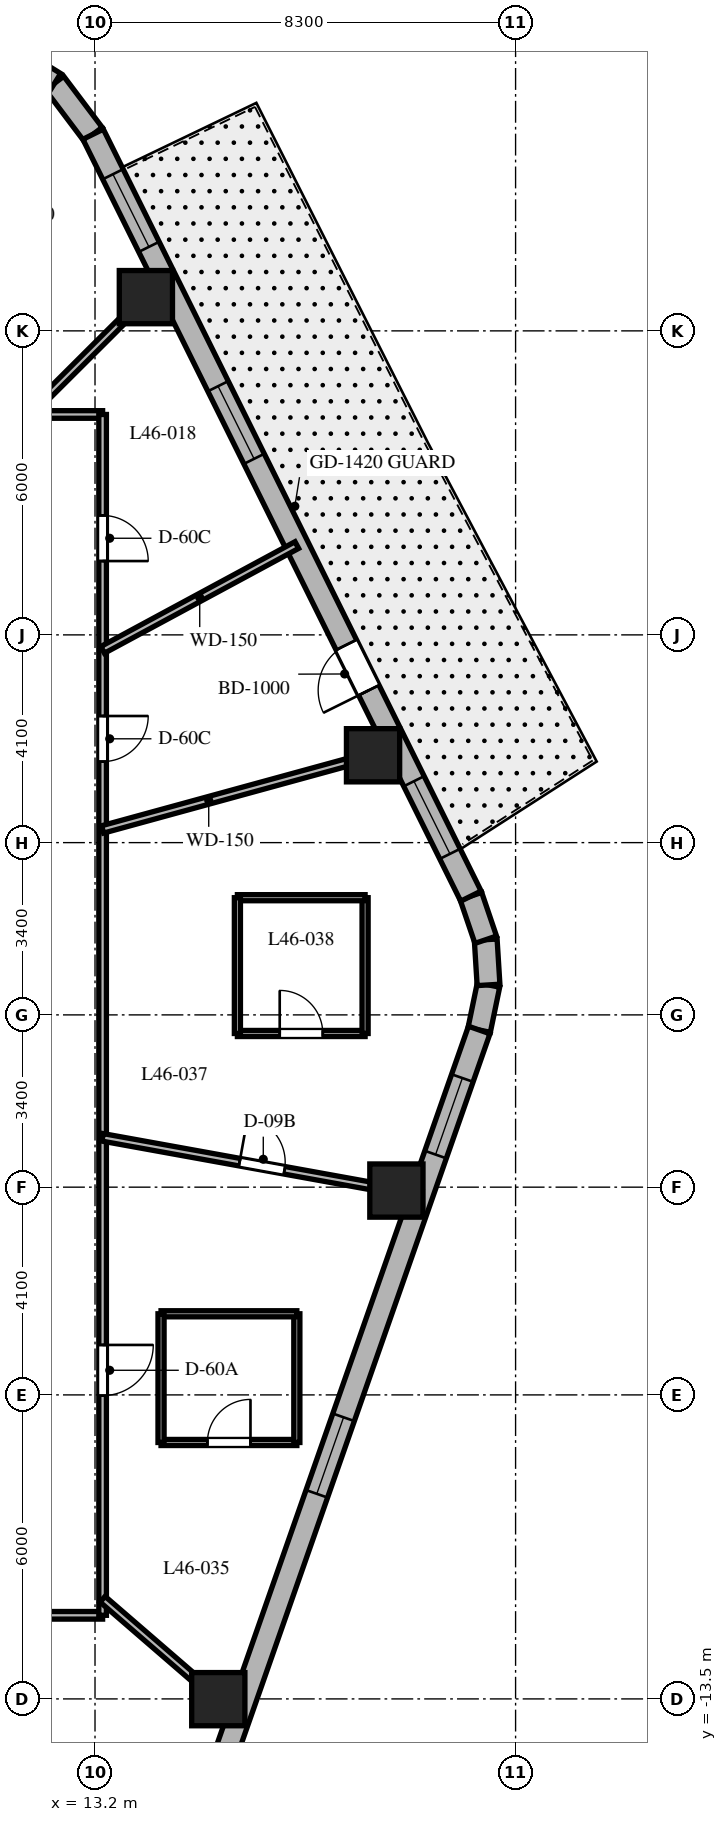
"""IFC4 building model, lengths in metres.
Left out: names, types, materials, properties, quantities, classifications, styles, units other than length and angle.
Written with IfcOpenShell. Run it as: python <this file> out.ifc"""

import sys

from ifc_helpers import new_model, si_unit, direction, frame, frame_2d, origin, origin_2d, place, context, subcontext, project, spatial, rectangle, extrude, element, fill, save


model = new_model("IFC4")
c1 = context("Model", 3, precision=1e-05, world=origin(), true_north=direction((0.0, 1.0)))
c2 = subcontext(c1, "Body", "Model", "MODEL_VIEW")
j1 = project(units=[si_unit("LENGTHUNIT", "METRE"), si_unit("PLANEANGLEUNIT", "RADIAN")], contexts=[c1])
p1 = place(None, origin())
s1 = spatial("IfcSite", under=j1, at=p1, CompositionType="ELEMENT")
p2 = place(p1, origin())
s2 = spatial("IfcBuilding", under=s1, at=p2, CompositionType="ELEMENT")
p3 = place(p2, frame((0.0, 0.0, 186.7)))
s3 = spatial("IfcBuildingStorey", under=s2, at=p3, CompositionType="ELEMENT", Elevation=186.7)
for number, where, z_axis, x_axis in (
    (1, (15.633, -13.505, 0.0), (0.0, 0.0, 1.0), (1.0, 0.0, 0.0)),
    (2, (19.148, -3.467, 0.0), (0.0, 0.0, 1.0), (1.0, 0.0, 0.0)),
    (3, (18.687, 5.124, 0.0), (0.0, 0.0, 1.0), (1.0, 0.0, 0.0)),
    (4, (14.204, 14.166, 0.0), (0.0, 0.0, 1.0), (1.0, 0.0, 0.0)),
):
    element("IfcColumn", number, at=place(p3, frame(where, z_axis=z_axis, x_axis=x_axis)), inside=s3, PredefinedType="COLUMN", context=c2, shape_type="SweptSolid", body=[
        extrude(rectangle(XDim=1.05, YDim=1.05, at=origin_2d()), origin(), (0.0, 0.0, 1.0), 3.7),
    ])
p4 = place(p3, frame((20.782, -0.298, 0.0), z_axis=(0.0, 0.0, 1.0), x_axis=(0.202570068411, 0.979267771033, 0.0)))
e5 = element("IfcWall", 5, at=p4, inside=s3, PredefinedType="SOLIDWALL", context=c2, shape_type="SweptSolid", body=[
    extrude(rectangle(XDim=0.909, YDim=0.45, at=frame_2d((0.454, 0.0))), origin(), (0.0, 0.0, 1.0), 3.4),
])
p5 = place(p3, frame((20.966, 0.592, 0.0), z_axis=(0.0, 0.0, 1.0), x_axis=(-0.061748898935, 0.998091715966, 0.0)))
e6 = element("IfcWall", 6, at=p5, inside=s3, PredefinedType="SOLIDWALL", context=c2, shape_type="SweptSolid", body=[
    extrude(rectangle(XDim=0.894, YDim=0.45, at=frame_2d((0.447, 0.0))), origin(), (0.0, 0.0, 1.0), 3.4),
])
p6 = place(p3, frame((20.911, 1.484, 0.0), z_axis=(0.0, 0.0, 1.0), x_axis=(-0.321623334353, 0.946867694453, 0.0)))
e7 = element("IfcWall", 7, at=p6, inside=s3, PredefinedType="SOLIDWALL", context=c2, shape_type="SweptSolid", body=[
    extrude(rectangle(XDim=0.909, YDim=0.45, at=frame_2d((0.454, 0.0))), origin(), (0.0, 0.0, 1.0), 3.4),
])
p7 = place(p3, frame((13.162, 17.381, 0.0), z_axis=(0.0, 0.0, 1.0), x_axis=(-0.601515770517, 0.798860925205, 0.0)))
e8 = element("IfcWall", 8, at=p7, inside=s3, PredefinedType="SOLIDWALL", context=c2, shape_type="SweptSolid", body=[
    extrude(rectangle(XDim=1.262, YDim=0.45, at=frame_2d((0.631, 0.0))), origin(), (0.0, 0.0, 1.0), 3.4),
])
p8 = place(p3, frame((12.403, 18.389, 0.0), z_axis=(0.0, 0.0, 1.0), x_axis=(-0.849795170926, 0.527113049991, 0.0)))
e9 = element("IfcWall", 9, at=p8, inside=s3, PredefinedType="SOLIDWALL", context=c2, shape_type="SweptSolid", body=[
    extrude(rectangle(XDim=1.241, YDim=0.45, at=frame_2d((0.62, 0.0))), origin(), (0.0, 0.0, 1.0), 3.4),
])
p9 = place(p3, frame((14.937, -16.993, 0.0), z_axis=(0.0, 0.0, 1.0), x_axis=(0.330431575061, 0.943829949834, 0.0)))
e10 = element("IfcWall", 10, at=p9, inside=s3, PredefinedType="SOLIDWALL", context=c2, shape_type="SweptSolid", body=[
    extrude(rectangle(XDim=17.689, YDim=0.45, at=frame_2d((8.844, 0.0))), origin(), (0.0, 0.0, 1.0), 3.4),
])
p10 = place(p9, frame((0.95, 0.0, 0.8)))
e11 = element("IfcOpeningElement", 11, at=p10, cuts=e10, PredefinedType="OPENING", context=c2, shape_type="SweptSolid", body=[
    extrude(rectangle(XDim=1.6, YDim=1.75, at=frame_2d((0.8, 0.875))), frame((0.0, 0.235, 0.0), z_axis=(0.0, -1.0, 0.0), x_axis=(1.0, 0.0, 0.0)), (0.0, 0.0, 1.0), 0.47),
])
p11 = place(p9, frame((7.99, 0.0, 0.8)))
e12 = element("IfcOpeningElement", 12, at=p11, cuts=e10, PredefinedType="OPENING", context=c2, shape_type="SweptSolid", body=[
    extrude(rectangle(XDim=1.6, YDim=1.75, at=frame_2d((0.8, 0.875))), frame((0.0, 0.235, 0.0), z_axis=(0.0, -1.0, 0.0), x_axis=(1.0, 0.0, 0.0)), (0.0, 0.0, 1.0), 0.47),
])
p12 = place(p9, frame((15.084, 0.0, 0.8)))
e13 = element("IfcOpeningElement", 13, at=p12, cuts=e10, PredefinedType="OPENING", context=c2, shape_type="SweptSolid", body=[
    extrude(rectangle(XDim=1.6, YDim=1.75, at=frame_2d((0.8, 0.875))), frame((0.0, 0.235, 0.0), z_axis=(0.0, -1.0, 0.0), x_axis=(1.0, 0.0, 0.0)), (0.0, 0.0, 1.0), 0.47),
])
p13 = place(p3, frame((20.618, 2.344, 0.0), z_axis=(0.0, 0.0, 1.0), x_axis=(-0.444243691097, 0.895905990002, 0.0)))
e14 = element("IfcWall", 14, at=p13, inside=s3, PredefinedType="SOLIDWALL", context=c2, shape_type="SweptSolid", body=[
    extrude(rectangle(XDim=16.784, YDim=0.45, at=frame_2d((8.392, 0.0))), origin(), (0.0, 0.0, 1.0), 3.4),
])
p14 = place(p13, frame((4.535, 0.0, 0.0)))
e15 = element("IfcOpeningElement", 15, at=p14, cuts=e14, PredefinedType="OPENING", context=c2, shape_type="SweptSolid", body=[
    extrude(rectangle(XDim=1.0, YDim=2.15, at=frame_2d((0.5, 1.075))), frame((0.0, 0.235, 0.0), z_axis=(0.0, -1.0, 0.0), x_axis=(1.0, 0.0, 0.0)), (0.0, 0.0, 1.0), 0.47),
])
p15 = place(p13, frame((9.633, 0.0, 0.8)))
e16 = element("IfcOpeningElement", 16, at=p15, cuts=e14, PredefinedType="OPENING", context=c2, shape_type="SweptSolid", body=[
    extrude(rectangle(XDim=1.6, YDim=1.75, at=frame_2d((0.8, 0.875))), frame((0.0, 0.235, 0.0), z_axis=(0.0, -1.0, 0.0), x_axis=(1.0, 0.0, 0.0)), (0.0, 0.0, 1.0), 0.47),
])
p16 = place(p13, frame((14.303, 0.0, 0.8)))
e17 = element("IfcOpeningElement", 17, at=p16, cuts=e14, PredefinedType="OPENING", context=c2, shape_type="SweptSolid", body=[
    extrude(rectangle(XDim=1.6, YDim=1.75, at=frame_2d((0.8, 0.875))), frame((0.0, 0.235, 0.0), z_axis=(0.0, -1.0, 0.0), x_axis=(1.0, 0.0, 0.0)), (0.0, 0.0, 1.0), 0.47),
])
p17 = place(p13, frame((0.931, 0.0, 0.8)))
e18 = element("IfcOpeningElement", 18, at=p17, cuts=e14, PredefinedType="OPENING", context=c2, shape_type="SweptSolid", body=[
    extrude(rectangle(XDim=1.6, YDim=1.75, at=frame_2d((0.8, 0.875))), frame((0.0, 0.235, 0.0), z_axis=(0.0, -1.0, 0.0), x_axis=(1.0, 0.0, 0.0)), (0.0, 0.0, 1.0), 0.47),
])
p18 = place(p3, frame((13.35, -11.85, 0.0), z_axis=(0.0, 0.0, 1.0), x_axis=(-1.0, 0.0, 0.0)))
e19 = element("IfcWall", 19, at=p18, inside=s3, PredefinedType="PARTITIONING", context=c2, shape_type="SweptSolid", body=[
    extrude(rectangle(XDim=26.7, YDim=0.15, at=frame_2d((13.35, 0.0))), origin(), (0.0, 0.0, 1.0), 2.84),
])
p19 = place(p18, frame((22.459, 0.0, 0.0)))
e20 = element("IfcOpeningElement", 20, at=p19, cuts=e19, PredefinedType="OPENING", context=c2, shape_type="SweptSolid", body=[
    extrude(rectangle(XDim=0.9, YDim=2.03, at=frame_2d((0.45, 1.015))), frame((0.0, 0.085, 0.0), z_axis=(0.0, -1.0, 0.0), x_axis=(1.0, 0.0, 0.0)), (0.0, 0.0, 1.0), 0.17),
])
p20 = place(p18, frame((18.304, 0.0, 0.0)))
e21 = element("IfcOpeningElement", 21, at=p20, cuts=e19, PredefinedType="OPENING", context=c2, shape_type="SweptSolid", body=[
    extrude(rectangle(XDim=0.9, YDim=2.03, at=frame_2d((0.45, 1.015))), frame((0.0, 0.085, 0.0), z_axis=(0.0, -1.0, 0.0), x_axis=(1.0, 0.0, 0.0)), (0.0, 0.0, 1.0), 0.17),
])
p21 = place(p18, frame((12.362, 0.0, 0.0)))
e22 = element("IfcOpeningElement", 22, at=p21, cuts=e19, PredefinedType="OPENING", context=c2, shape_type="SweptSolid", body=[
    extrude(rectangle(XDim=0.95, YDim=2.03, at=frame_2d((0.475, 1.015))), frame((0.0, 0.085, 0.0), z_axis=(0.0, -1.0, 0.0), x_axis=(1.0, 0.0, 0.0)), (0.0, 0.0, 1.0), 0.17),
])
p22 = place(p18, frame((3.995, 0.0, 0.0)))
e23 = element("IfcOpeningElement", 23, at=p22, cuts=e19, PredefinedType="OPENING", context=c2, shape_type="SweptSolid", body=[
    extrude(rectangle(XDim=0.95, YDim=2.03, at=frame_2d((0.475, 1.015))), frame((0.0, 0.085, 0.0), z_axis=(0.0, -1.0, 0.0), x_axis=(1.0, 0.0, 0.0)), (0.0, 0.0, 1.0), 0.17),
])
p23 = place(p3, frame((-13.35, 11.85, 0.0), z_axis=(0.0, 0.0, 1.0), x_axis=(1.0, 0.0, 0.0)))
e24 = element("IfcWall", 24, at=p23, inside=s3, PredefinedType="PARTITIONING", context=c2, shape_type="SweptSolid", body=[
    extrude(rectangle(XDim=26.7, YDim=0.15, at=frame_2d((13.35, 0.0))), origin(), (0.0, 0.0, 1.0), 2.84),
])
p24 = place(p23, frame((20.682, 0.0, 0.0)))
e25 = element("IfcOpeningElement", 25, at=p24, cuts=e24, PredefinedType="OPENING", context=c2, shape_type="SweptSolid", body=[
    extrude(rectangle(XDim=0.95, YDim=2.03, at=frame_2d((0.475, 1.015))), frame((0.0, 0.085, 0.0), z_axis=(0.0, -1.0, 0.0), x_axis=(1.0, 0.0, 0.0)), (0.0, 0.0, 1.0), 0.17),
])
p25 = place(p23, frame((12.362, 0.0, 0.0)))
e26 = element("IfcOpeningElement", 26, at=p25, cuts=e24, PredefinedType="OPENING", context=c2, shape_type="SweptSolid", body=[
    extrude(rectangle(XDim=0.95, YDim=2.03, at=frame_2d((0.475, 1.015))), frame((0.0, 0.085, 0.0), z_axis=(0.0, -1.0, 0.0), x_axis=(1.0, 0.0, 0.0)), (0.0, 0.0, 1.0), 0.17),
])
p26 = place(p23, frame((3.995, 0.0, 0.0)))
e27 = element("IfcOpeningElement", 27, at=p26, cuts=e24, PredefinedType="OPENING", context=c2, shape_type="SweptSolid", body=[
    extrude(rectangle(XDim=0.95, YDim=2.03, at=frame_2d((0.475, 1.015))), frame((0.0, 0.085, 0.0), z_axis=(0.0, -1.0, 0.0), x_axis=(1.0, 0.0, 0.0)), (0.0, 0.0, 1.0), 0.17),
])
p27 = place(p3, frame((13.35, 11.85, 0.0), z_axis=(0.0, 0.0, 1.0), x_axis=(0.0, -1.0, 0.0)))
e28 = element("IfcWall", 28, at=p27, inside=s3, PredefinedType="PARTITIONING", context=c2, shape_type="SweptSolid", body=[
    extrude(rectangle(XDim=23.7, YDim=0.15, at=frame_2d((11.85, 0.0))), origin(), (0.0, 0.0, 1.0), 2.84),
])
p28 = place(p27, frame((5.951, 0.0, 0.0)))
e29 = element("IfcOpeningElement", 29, at=p28, cuts=e28, PredefinedType="OPENING", context=c2, shape_type="SweptSolid", body=[
    extrude(rectangle(XDim=0.9, YDim=2.03, at=frame_2d((0.45, 1.015))), frame((0.0, 0.085, 0.0), z_axis=(0.0, -1.0, 0.0), x_axis=(1.0, 0.0, 0.0)), (0.0, 0.0, 1.0), 0.17),
])
p29 = place(p27, frame((1.993, 0.0, 0.0)))
e30 = element("IfcOpeningElement", 30, at=p29, cuts=e28, PredefinedType="OPENING", context=c2, shape_type="SweptSolid", body=[
    extrude(rectangle(XDim=0.9, YDim=2.03, at=frame_2d((0.45, 1.015))), frame((0.0, 0.085, 0.0), z_axis=(0.0, -1.0, 0.0), x_axis=(1.0, 0.0, 0.0)), (0.0, 0.0, 1.0), 0.17),
])
p30 = place(p27, frame((18.364, 0.0, 0.0)))
e31 = element("IfcOpeningElement", 31, at=p30, cuts=e28, PredefinedType="OPENING", context=c2, shape_type="SweptSolid", body=[
    extrude(rectangle(XDim=1.0, YDim=2.03, at=frame_2d((0.5, 1.015))), frame((0.0, 0.085, 0.0), z_axis=(0.0, -1.0, 0.0), x_axis=(1.0, 0.0, 0.0)), (0.0, 0.0, 1.0), 0.17),
])
p31 = place(p3, frame((13.35, 3.661, 0.0), z_axis=(0.0, 0.0, 1.0), x_axis=(0.964397145454, 0.264458211898, 0.0)))
e32 = element("IfcWall", 32, at=p31, inside=s3, PredefinedType="PARTITIONING", context=c2, shape_type="SweptSolid", body=[
    extrude(rectangle(XDim=6.039, YDim=0.15, at=frame_2d((3.019, 0.0))), origin(), (0.0, 0.0, 1.0), 2.64),
])
p32 = place(p3, frame((13.35, 7.204, 0.0), z_axis=(0.0, 0.0, 1.0), x_axis=(0.880033329067, 0.474911928394, 0.0)))
e33 = element("IfcWall", 33, at=p32, inside=s3, PredefinedType="PARTITIONING", context=c2, shape_type="SweptSolid", body=[
    extrude(rectangle(XDim=4.355, YDim=0.15, at=frame_2d((2.178, 0.0))), origin(), (0.0, 0.0, 1.0), 2.64),
])
p33 = place(p3, frame((11.882, 11.85, 0.0), z_axis=(0.0, 0.0, 1.0), x_axis=(0.708037373639, 0.706174962407, 0.0)))
e34 = element("IfcWall", 34, at=p33, inside=s3, PredefinedType="PARTITIONING", context=c2, shape_type="SweptSolid", body=[
    extrude(rectangle(XDim=3.802, YDim=0.15, at=frame_2d((1.901, 0.0))), origin(), (0.0, 0.0, 1.0), 2.64),
])
p34 = place(p3, frame((13.35, -11.533, 0.0), z_axis=(0.0, 0.0, 1.0), x_axis=(0.756711647314, -0.65374879183, 0.0)))
e35 = element("IfcWall", 35, at=p34, inside=s3, PredefinedType="PARTITIONING", context=c2, shape_type="SweptSolid", body=[
    extrude(rectangle(XDim=3.55, YDim=0.15, at=frame_2d((1.775, 0.0))), origin(), (0.0, 0.0, 1.0), 2.64),
])
p35 = place(p3, frame((13.35, -2.417, 0.0), z_axis=(0.0, 0.0, 1.0), x_axis=(0.98399796473, -0.178179699761, 0.0)))
e36 = element("IfcWall", 36, at=p35, inside=s3, PredefinedType="PARTITIONING", context=c2, shape_type="SweptSolid", body=[
    extrude(rectangle(XDim=6.393, YDim=0.15, at=frame_2d((3.197, 0.0))), origin(), (0.0, 0.0, 1.0), 2.64),
])
p36 = place(p35, frame((2.747, 0.0, 0.0)))
e37 = element("IfcOpeningElement", 37, at=p36, cuts=e36, PredefinedType="OPENING", context=c2, shape_type="SweptSolid", body=[
    extrude(rectangle(XDim=0.9, YDim=2.03, at=frame_2d((0.45, 1.015))), frame((0.0, 0.085, 0.0), z_axis=(0.0, -1.0, 0.0), x_axis=(1.0, 0.0, 0.0)), (0.0, 0.0, 1.0), 0.17),
])
p37 = place(p3, frame((14.503, -8.439, 0.0), z_axis=(0.0, 0.0, 1.0), x_axis=(1.0, 0.0, 0.0)))
e38 = element("IfcWall", 38, at=p37, inside=s3, PredefinedType="PARTITIONING", context=c2, shape_type="SweptSolid", body=[
    extrude(rectangle(XDim=2.68, YDim=0.12, at=frame_2d((1.34, 0.0))), origin(), (0.0, 0.0, 1.0), 2.972),
])
p38 = place(p37, frame((0.915, 0.0, 0.0)))
e39 = element("IfcOpeningElement", 39, at=p38, cuts=e38, PredefinedType="OPENING", context=c2, shape_type="SweptSolid", body=[
    extrude(rectangle(XDim=0.85, YDim=2.03, at=frame_2d((0.425, 1.015))), frame((0.0, 0.07, 0.0), z_axis=(0.0, -1.0, 0.0), x_axis=(1.0, 0.0, 0.0)), (0.0, 0.0, 1.0), 0.14),
])
p39 = place(p3, frame((17.183, -8.439, 0.0), z_axis=(0.0, 0.0, 1.0), x_axis=(0.0, 1.0, 0.0)))
e40 = element("IfcWall", 40, at=p39, inside=s3, PredefinedType="PARTITIONING", context=c2, shape_type="SweptSolid", body=[
    extrude(rectangle(XDim=2.54, YDim=0.12, at=frame_2d((1.27, 0.0))), origin(), (0.0, 0.0, 1.0), 2.64),
])
p40 = place(p3, frame((17.183, -5.899, 0.0), z_axis=(0.0, 0.0, 1.0), x_axis=(-1.0, 0.0, 0.0)))
e41 = element("IfcWall", 41, at=p40, inside=s3, PredefinedType="PARTITIONING", context=c2, shape_type="SweptSolid", body=[
    extrude(rectangle(XDim=2.68, YDim=0.12, at=frame_2d((1.34, 0.0))), origin(), (0.0, 0.0, 1.0), 2.972),
])
p41 = place(p3, frame((14.503, -5.899, 0.0), z_axis=(0.0, 0.0, 1.0), x_axis=(0.0, -1.0, 0.0)))
e42 = element("IfcWall", 42, at=p41, inside=s3, PredefinedType="PARTITIONING", context=c2, shape_type="SweptSolid", body=[
    extrude(rectangle(XDim=2.54, YDim=0.12, at=frame_2d((1.27, 0.0))), origin(), (0.0, 0.0, 1.0), 3.4),
])
p42 = place(p3, frame((16.01, -0.367, 0.0), z_axis=(0.0, 0.0, 1.0), x_axis=(1.0, 0.0, 0.0)))
e43 = element("IfcWall", 43, at=p42, inside=s3, PredefinedType="PARTITIONING", context=c2, shape_type="SweptSolid", body=[
    extrude(rectangle(XDim=2.52, YDim=0.12, at=frame_2d((1.26, 0.0))), origin(), (0.0, 0.0, 1.0), 3.4),
])
p43 = place(p42, frame((0.835, 0.0, 0.0)))
e44 = element("IfcOpeningElement", 44, at=p43, cuts=e43, PredefinedType="OPENING", context=c2, shape_type="SweptSolid", body=[
    extrude(rectangle(XDim=0.85, YDim=2.03, at=frame_2d((0.425, 1.015))), frame((0.0, 0.07, 0.0), z_axis=(0.0, -1.0, 0.0), x_axis=(1.0, 0.0, 0.0)), (0.0, 0.0, 1.0), 0.14),
])
p44 = place(p3, frame((18.53, -0.367, 0.0), z_axis=(0.0, 0.0, 1.0), x_axis=(0.0, 1.0, 0.0)))
e45 = element("IfcWall", 45, at=p44, inside=s3, PredefinedType="PARTITIONING", context=c2, shape_type="SweptSolid", body=[
    extrude(rectangle(XDim=2.68, YDim=0.12, at=frame_2d((1.34, 0.0))), origin(), (0.0, 0.0, 1.0), 2.64),
])
p45 = place(p3, frame((18.53, 2.313, 0.0), z_axis=(0.0, 0.0, 1.0), x_axis=(-1.0, 0.0, 0.0)))
e46 = element("IfcWall", 46, at=p45, inside=s3, PredefinedType="PARTITIONING", context=c2, shape_type="SweptSolid", body=[
    extrude(rectangle(XDim=2.52, YDim=0.12, at=frame_2d((1.26, 0.0))), origin(), (0.0, 0.0, 1.0), 3.4),
])
p46 = place(p3, frame((16.01, 2.313, 0.0), z_axis=(0.0, 0.0, 1.0), x_axis=(0.0, -1.0, 0.0)))
e47 = element("IfcWall", 47, at=p46, inside=s3, PredefinedType="PARTITIONING", context=c2, shape_type="SweptSolid", body=[
    extrude(rectangle(XDim=2.68, YDim=0.12, at=frame_2d((1.34, 0.0))), origin(), (0.0, 0.0, 1.0), 3.4),
])
p47 = place(p11, origin())
e48 = element("IfcWindow", 48, at=p47, inside=s3, PartitioningType="SINGLE_PANEL", PredefinedType="WINDOW", context=c2, shape_type="SweptSolid", body=[
    extrude(rectangle(XDim=1.6, YDim=1.75, at=frame_2d((0.8, 0.875))), frame((0.0, 0.03, 0.0), z_axis=(0.0, -1.0, 0.0), x_axis=(1.0, 0.0, 0.0)), (0.0, 0.0, 1.0), 0.06),
])
fill(e12, e48)
p48 = place(p12, origin())
e49 = element("IfcWindow", 49, at=p48, inside=s3, PartitioningType="SINGLE_PANEL", PredefinedType="WINDOW", context=c2, shape_type="SweptSolid", body=[
    extrude(rectangle(XDim=1.6, YDim=1.75, at=frame_2d((0.8, 0.875))), frame((0.0, 0.03, 0.0), z_axis=(0.0, -1.0, 0.0), x_axis=(1.0, 0.0, 0.0)), (0.0, 0.0, 1.0), 0.06),
])
fill(e13, e49)
p49 = place(p14, origin())
e50 = element("IfcDoor", 50, at=p49, inside=s3, OperationType="SINGLE_SWING_LEFT", PredefinedType="DOOR", context=c2, shape_type="SweptSolid", body=[
    extrude(rectangle(XDim=1.0, YDim=2.15, at=frame_2d((0.5, 1.075))), frame((0.0, 0.025, 0.0), z_axis=(0.0, -1.0, 0.0), x_axis=(1.0, 0.0, 0.0)), (0.0, 0.0, 1.0), 0.05),
])
fill(e15, e50)
p50 = place(p15, origin())
e51 = element("IfcWindow", 51, at=p50, inside=s3, PartitioningType="SINGLE_PANEL", PredefinedType="WINDOW", context=c2, shape_type="SweptSolid", body=[
    extrude(rectangle(XDim=1.6, YDim=1.75, at=frame_2d((0.8, 0.875))), frame((0.0, 0.03, 0.0), z_axis=(0.0, -1.0, 0.0), x_axis=(1.0, 0.0, 0.0)), (0.0, 0.0, 1.0), 0.06),
])
fill(e16, e51)
p51 = place(p16, origin())
e52 = element("IfcWindow", 52, at=p51, inside=s3, PartitioningType="SINGLE_PANEL", PredefinedType="WINDOW", context=c2, shape_type="SweptSolid", body=[
    extrude(rectangle(XDim=1.6, YDim=1.75, at=frame_2d((0.8, 0.875))), frame((0.0, 0.03, 0.0), z_axis=(0.0, -1.0, 0.0), x_axis=(1.0, 0.0, 0.0)), (0.0, 0.0, 1.0), 0.06),
])
fill(e17, e52)
p52 = place(p17, origin())
e53 = element("IfcWindow", 53, at=p52, inside=s3, PartitioningType="SINGLE_PANEL", PredefinedType="WINDOW", context=c2, shape_type="SweptSolid", body=[
    extrude(rectangle(XDim=1.6, YDim=1.75, at=frame_2d((0.8, 0.875))), frame((0.0, 0.03, 0.0), z_axis=(0.0, -1.0, 0.0), x_axis=(1.0, 0.0, 0.0)), (0.0, 0.0, 1.0), 0.06),
])
fill(e18, e53)
p53 = place(p28, origin())
e54 = element("IfcDoor", 54, at=p53, inside=s3, OperationType="SINGLE_SWING_LEFT", PredefinedType="DOOR", context=c2, shape_type="SweptSolid", body=[
    extrude(rectangle(XDim=0.9, YDim=2.03, at=frame_2d((0.45, 1.015))), frame((0.0, 0.025, 0.0), z_axis=(0.0, -1.0, 0.0), x_axis=(1.0, 0.0, 0.0)), (0.0, 0.0, 1.0), 0.05),
])
fill(e29, e54)
p54 = place(p29, origin())
e55 = element("IfcDoor", 55, at=p54, inside=s3, OperationType="SINGLE_SWING_RIGHT", PredefinedType="DOOR", context=c2, shape_type="SweptSolid", body=[
    extrude(rectangle(XDim=0.9, YDim=2.03, at=frame_2d((0.45, 1.015))), frame((0.0, 0.025, 0.0), z_axis=(0.0, -1.0, 0.0), x_axis=(1.0, 0.0, 0.0)), (0.0, 0.0, 1.0), 0.05),
])
fill(e30, e55)
p55 = place(p30, origin())
e56 = element("IfcDoor", 56, at=p55, inside=s3, OperationType="SINGLE_SWING_LEFT", PredefinedType="DOOR", context=c2, shape_type="SweptSolid", body=[
    extrude(rectangle(XDim=1.0, YDim=2.03, at=frame_2d((0.5, 1.015))), frame((0.0, 0.025, 0.0), z_axis=(0.0, -1.0, 0.0), x_axis=(1.0, 0.0, 0.0)), (0.0, 0.0, 1.0), 0.05),
])
fill(e31, e56)
p56 = place(p36, origin())
e57 = element("IfcDoor", 57, at=p56, inside=s3, OperationType="SINGLE_SWING_LEFT", PredefinedType="DOOR", context=c2, shape_type="SweptSolid", body=[
    extrude(rectangle(XDim=0.9, YDim=2.03, at=frame_2d((0.45, 1.015))), frame((0.0, 0.025, 0.0), z_axis=(0.0, -1.0, 0.0), x_axis=(1.0, 0.0, 0.0)), (0.0, 0.0, 1.0), 0.05),
])
fill(e37, e57)
p57 = place(p38, origin())
e58 = element("IfcDoor", 58, at=p57, inside=s3, OperationType="SINGLE_SWING_RIGHT", PredefinedType="DOOR", context=c2, shape_type="SweptSolid", body=[
    extrude(rectangle(XDim=0.85, YDim=2.03, at=frame_2d((0.425, 1.015))), frame((0.0, 0.025, 0.0), z_axis=(0.0, -1.0, 0.0), x_axis=(1.0, 0.0, 0.0)), (0.0, 0.0, 1.0), 0.05),
])
fill(e39, e58)
p58 = place(p43, origin())
e59 = element("IfcDoor", 59, at=p58, inside=s3, OperationType="SINGLE_SWING_LEFT", PredefinedType="DOOR", context=c2, shape_type="SweptSolid", body=[
    extrude(rectangle(XDim=0.85, YDim=2.03, at=frame_2d((0.425, 1.015))), frame((0.0, 0.025, 0.0), z_axis=(0.0, -1.0, 0.0), x_axis=(1.0, 0.0, 0.0)), (0.0, 0.0, 1.0), 0.05),
])
fill(e44, e59)
save(model, sys.argv[1])
